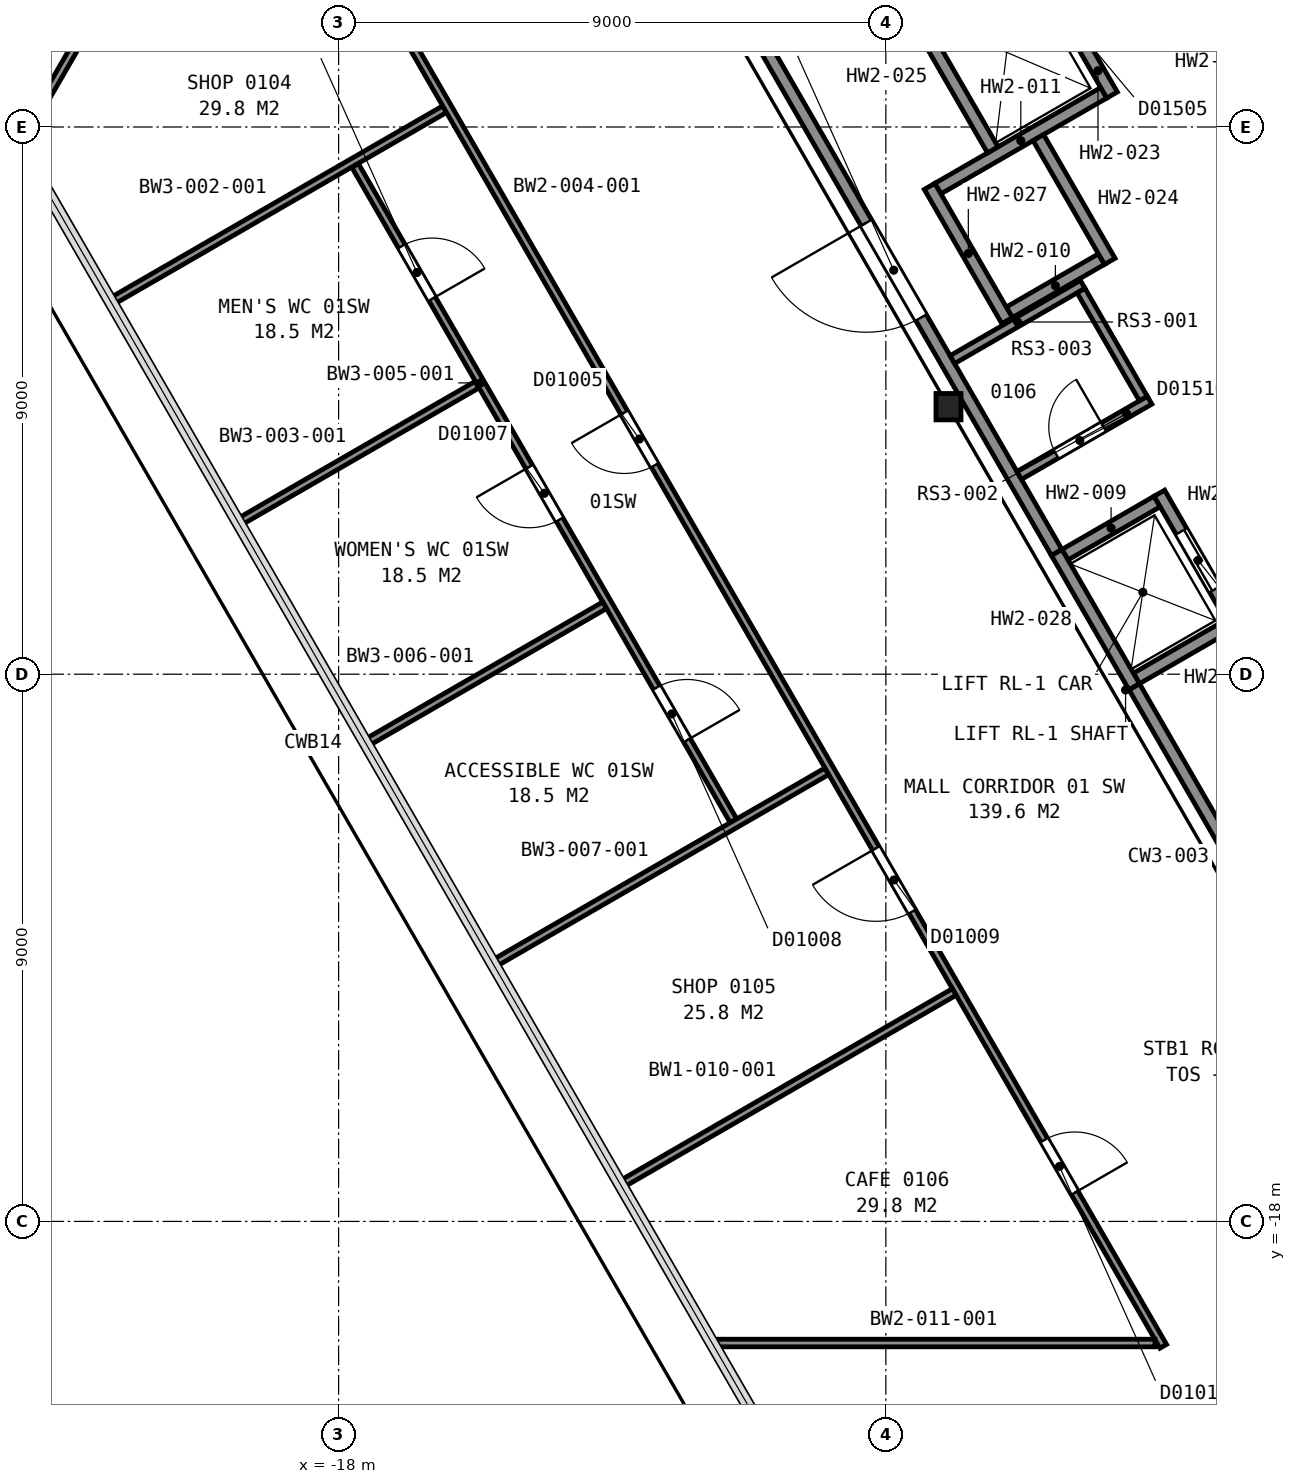
"""IFC4 building model, lengths in metres.
Left out: names, types, materials, properties, quantities, classifications, styles, units other than length and angle.
Written with IfcOpenShell. Run it as: python <this file> out.ifc"""

import sys

from ifc_helpers import new_model, si_unit, direction, frame, frame_2d, origin, origin_2d, place, context, subcontext, project, spatial, rectangle, i_section, extrude, element, fill, save


model = new_model("IFC4")
c1 = context("Model", 3, precision=1e-05, world=origin(), true_north=direction((0.0, 1.0)))
c2 = subcontext(c1, "Body", "Model", "MODEL_VIEW")
j1 = project(units=[si_unit("LENGTHUNIT", "METRE"), si_unit("PLANEANGLEUNIT", "RADIAN")], contexts=[c1])
p1 = place(None, origin())
s1 = spatial("IfcSite", under=j1, at=p1, CompositionType="ELEMENT")
p2 = place(p1, origin())
s2 = spatial("IfcBuilding", under=s1, at=p2, CompositionType="ELEMENT")
p3 = place(p2, frame((0.0, 0.0, 12.0)))
s3 = spatial("IfcBuildingStorey", under=s2, at=p3, CompositionType="ELEMENT", Elevation=12.0)
p4 = place(p3, frame((-7.97, -4.6, 0.0), z_axis=(0.0, 0.0, 1.0), x_axis=(1.0, 0.0, 0.0)))
e1 = element("IfcColumn", 1, at=p4, inside=s3, PredefinedType="COLUMN", context=c2, shape_type="SweptSolid", body=[
    extrude(i_section(OverallWidth=0.411, OverallDepth=0.434, WebThickness=0.036, FlangeThickness=0.057, FilletRadius=0.015, at=origin_2d()), origin(), (0.0, 0.0, 1.0), 5.4),
])
for number, where, z_axis, x_axis in (
    (2, (-4.879, -9.07, 0.0), (0.0, 0.0, 1.0), (0.866, 0.5, 0.0)),
    (3, (-6.054, -7.034, 0.0), (0.0, 0.0, 1.0), (0.866, 0.5, 0.0)),
    (4, (-6.97, -3.048, 0.0), (0.0, 0.0, 1.0), (0.866, 0.5, 0.0)),
):
    element("IfcWall", number, at=place(p3, frame(where, z_axis=z_axis, x_axis=x_axis)), inside=s3, PredefinedType="PARTITIONING", context=c2, shape_type="SweptSolid", body=[
        extrude(rectangle(XDim=1.75, YDim=0.2, at=frame_2d((0.875, 0.0))), origin(), (0.0, 0.0, 1.0), 5.4),
    ])
p5 = place(p3, frame((-8.145, -1.013, 0.0), z_axis=(0.0, 0.0, 1.0), x_axis=(0.866016494683, 0.500015430699, 0.0)))
e5 = element("IfcWall", 5, at=p5, inside=s3, PredefinedType="PARTITIONING", context=c2, shape_type="SweptSolid", body=[
    extrude(rectangle(XDim=3.15, YDim=0.2, at=frame_2d((1.575, 0.0))), origin(), (0.0, 0.0, 1.0), 5.4),
])
p6 = place(p3, frame((-5.28, 0.525, 0.0), z_axis=(0.0, 0.0, 1.0), x_axis=(-0.500037662692, 0.866003658127, 0.0)))
e6 = element("IfcWall", 6, at=p6, inside=s3, PredefinedType="PARTITIONING", context=c2, shape_type="SweptSolid", body=[
    extrude(rectangle(XDim=2.95, YDim=0.2, at=frame_2d((1.475, 0.0))), origin(), (0.0, 0.0, 1.0), 5.4),
])
p7 = place(p6, frame((0.925, 0.0, 0.0)))
e7 = element("IfcOpeningElement", 7, at=p7, cuts=e6, PredefinedType="OPENING", context=c2, shape_type="SweptSolid", body=[
    extrude(rectangle(XDim=1.1, YDim=2.1, at=frame_2d((0.55, 1.05))), frame((0.0, 0.11, 0.0), z_axis=(0.0, -1.0, 0.0), x_axis=(1.0, 0.0, 0.0)), (0.0, 0.0, 1.0), 0.22),
])
p8 = place(p3, frame((-5.318, -2.21, 0.0), z_axis=(0.0, 0.0, 1.0), x_axis=(-0.499938297808, 0.866061024631, 0.0)))
e8 = element("IfcWall", 8, at=p8, inside=s3, PredefinedType="PARTITIONING", context=c2, shape_type="SweptSolid", body=[
    extrude(rectangle(XDim=2.35, YDim=0.2, at=frame_2d((1.175, 0.0))), origin(), (0.0, 0.0, 1.0), 5.4),
])
p9 = place(p3, frame((-7.242, -0.376, 0.0), z_axis=(0.0, 0.0, 1.0), x_axis=(-0.499996545922, 0.866027397988, 0.0)))
e9 = element("IfcWall", 9, at=p9, inside=s3, PredefinedType="PARTITIONING", context=c2, shape_type="SweptSolid", body=[
    extrude(rectangle(XDim=2.75, YDim=0.2, at=frame_2d((1.375, 0.0))), origin(), (0.0, 0.0, 1.0), 5.4),
])
p10 = place(p3, frame((-3.227, -8.231, 0.0), z_axis=(0.0, 0.0, 1.0), x_axis=(-0.499948979701, 0.866054858364, 0.0)))
e10 = element("IfcWall", 10, at=p10, inside=s3, PredefinedType="PARTITIONING", context=c2, shape_type="SweptSolid", body=[
    extrude(rectangle(XDim=2.55, YDim=0.2, at=frame_2d((1.275, 0.0))), origin(), (0.0, 0.0, 1.0), 5.4),
])
p11 = place(p10, frame((0.725, 0.0, 0.0)))
e11 = element("IfcOpeningElement", 11, at=p11, cuts=e10, PredefinedType="OPENING", context=c2, shape_type="SweptSolid", body=[
    extrude(rectangle(XDim=1.1, YDim=2.1, at=frame_2d((0.55, 1.05))), frame((0.0, 0.11, 0.0), z_axis=(0.0, -1.0, 0.0), x_axis=(1.0, 0.0, 0.0)), (0.0, 0.0, 1.0), 0.22),
])
for number, where, z_axis, x_axis in (
    (12, (-7.006, -3.185, 0.0), (0.0, 0.0, 1.0), (-0.5, 0.866, 0.0)),
    (13, (-4.916, -9.206, 0.0), (0.0, 0.0, 1.0), (-0.5, 0.866, 0.0)),
):
    element("IfcWall", number, at=place(p3, frame(where, z_axis=z_axis, x_axis=x_axis)), inside=s3, PredefinedType="PARTITIONING", context=c2, shape_type="SweptSolid", body=[
        extrude(rectangle(XDim=2.55, YDim=0.2, at=frame_2d((1.275, 0.0))), origin(), (0.0, 0.0, 1.0), 5.4),
    ])
p12 = place(p3, frame((-13.666, 5.95, 0.0), z_axis=(0.0, 0.0, 1.0), x_axis=(0.499971736997, -0.866041720822, 0.0)))
e14 = element("IfcWall", 14, at=p12, inside=s3, PredefinedType="PARTITIONING", context=c2, shape_type="SweptSolid", body=[
    extrude(rectangle(XDim=14.949, YDim=0.2, at=frame_2d((7.475, 0.0))), origin(), (0.0, 0.0, 1.0), 5.15),
])
p13 = place(p12, frame((8.69, 0.0, 0.0)))
e15 = element("IfcOpeningElement", 15, at=p13, cuts=e14, PredefinedType="OPENING", context=c2, shape_type="SweptSolid", body=[
    extrude(rectangle(XDim=1.8, YDim=2.1, at=frame_2d((0.9, 1.05))), frame((0.0, 0.11, 0.0), z_axis=(0.0, -1.0, 0.0), x_axis=(1.0, 0.0, 0.0)), (0.0, 0.0, 1.0), 0.22),
])
p14 = place(p3, frame((-7.906, -3.826, 0.0), z_axis=(0.0, 0.0, 1.0), x_axis=(0.866031185235, 0.4999899861, 0.0)))
e16 = element("IfcWall", 16, at=p14, inside=s3, PredefinedType="PARTITIONING", context=c2, shape_type="SweptSolid", body=[
    extrude(rectangle(XDim=2.475, YDim=0.15, at=frame_2d((1.238, 0.0))), origin(), (0.0, 0.0, 1.0), 5.15),
])
p15 = place(p3, frame((-6.806, -5.731, 0.0), z_axis=(0.0, 0.0, 1.0), x_axis=(0.866006523861, 0.500032699561, 0.0)))
e17 = element("IfcWall", 17, at=p15, inside=s3, PredefinedType="PARTITIONING", context=c2, shape_type="SweptSolid", body=[
    extrude(rectangle(XDim=2.475, YDim=0.15, at=frame_2d((1.237, 0.0))), origin(), (0.0, 0.0, 1.0), 5.15),
])
p16 = place(p15, frame((0.7, 0.0, 0.0)))
e18 = element("IfcOpeningElement", 18, at=p16, cuts=e17, PredefinedType="OPENING", context=c2, shape_type="SweptSolid", body=[
    extrude(rectangle(XDim=0.9, YDim=2.1, at=frame_2d((0.45, 1.05))), frame((0.0, 0.085, 0.0), z_axis=(0.0, -1.0, 0.0), x_axis=(1.0, 0.0, 0.0)), (0.0, 0.0, 1.0), 0.17),
])
p17 = place(p3, frame((-5.791, -2.691, 0.0), z_axis=(0.0, 0.0, 1.0), x_axis=(0.500007699544, -0.866020958405, 0.0)))
e19 = element("IfcWall", 19, at=p17, inside=s3, PredefinedType="PARTITIONING", context=c2, shape_type="SweptSolid", body=[
    extrude(rectangle(XDim=2.05, YDim=0.15, at=frame_2d((1.025, 0.0))), origin(), (0.0, 0.0, 1.0), 5.15),
])
p18 = place(p3, frame((-4.914, -9.208, 0.0), z_axis=(0.0, 0.0, 1.0), x_axis=(0.499947703927, -0.866055594831, 0.0)))
e20 = element("IfcWall", 20, at=p18, inside=s3, PredefinedType="PARTITIONING", context=c2, shape_type="SweptSolid", body=[
    extrude(rectangle(XDim=6.474, YDim=0.2, at=frame_2d((3.237, 0.0))), origin(), (0.0, 0.0, 1.0), 5.15),
])
p19 = place(p3, frame((-23.25, -0.27, 0.0), z_axis=(0.0, 0.0, 1.0), x_axis=(0.500002873931, 0.866023744513, 0.0)))
e21 = element("IfcWall", 21, at=p19, inside=s3, PredefinedType="PARTITIONING", context=c2, shape_type="SweptSolid", body=[
    extrude(rectangle(XDim=7.285, YDim=0.125, at=frame_2d((3.643, 0.0))), origin(), (0.0, 0.0, 1.0), 5.24),
])
p20 = place(p3, frame((-21.746, -2.875, 0.0), z_axis=(0.0, 0.0, 1.0), x_axis=(0.866118237319, 0.499839173118, 0.0)))
e22 = element("IfcWall", 22, at=p20, inside=s3, PredefinedType="PARTITIONING", context=c2, shape_type="SweptSolid", body=[
    extrude(rectangle(XDim=6.337, YDim=0.125, at=frame_2d((3.169, 0.0))), origin(), (0.0, 0.0, 1.0), 4.253),
])
p21 = place(p3, frame((-19.65, -6.505, 0.0), z_axis=(0.0, 0.0, 1.0), x_axis=(0.866053739465, 0.49995091795, 0.0)))
e23 = element("IfcWall", 23, at=p21, inside=s3, PredefinedType="PARTITIONING", context=c2, shape_type="SweptSolid", body=[
    extrude(rectangle(XDim=4.533, YDim=0.125, at=frame_2d((2.266, 0.0))), origin(), (0.0, 0.0, 1.0), 5.24),
])
p22 = place(p3, frame((-4.438, -20.054, 0.0), z_axis=(0.0, 0.0, 1.0), x_axis=(-0.499994028088, 0.866028851642, 0.0)))
e24 = element("IfcWall", 24, at=p22, inside=s3, PredefinedType="PARTITIONING", context=c2, shape_type="SweptSolid", body=[
    extrude(rectangle(XDim=30.297, YDim=0.125, at=frame_2d((15.148, 0.0))), origin(), (0.0, 0.0, 1.0), 4.253),
])
p23 = place(p22, frame((26.285, 0.0, 0.0)))
e25 = element("IfcOpeningElement", 25, at=p23, cuts=e24, PredefinedType="OPENING", context=c2, shape_type="SweptSolid", body=[
    extrude(rectangle(XDim=1.2, YDim=2.1, at=frame_2d((0.6, 1.05))), frame((0.0, 0.073, 0.0), z_axis=(0.0, -1.0, 0.0), x_axis=(1.0, 0.0, 0.0)), (0.0, 0.0, 1.0), 0.145),
])
p24 = place(p22, frame((16.731, 0.0, 0.0)))
e26 = element("IfcOpeningElement", 26, at=p24, cuts=e24, PredefinedType="OPENING", context=c2, shape_type="SweptSolid", body=[
    extrude(rectangle(XDim=1.0, YDim=2.1, at=frame_2d((0.5, 1.05))), frame((0.0, 0.073, 0.0), z_axis=(0.0, -1.0, 0.0), x_axis=(1.0, 0.0, 0.0)), (0.0, 0.0, 1.0), 0.145),
])
p25 = place(p22, frame((8.257, 0.0, 0.0)))
e27 = element("IfcOpeningElement", 27, at=p25, cuts=e24, PredefinedType="OPENING", context=c2, shape_type="SweptSolid", body=[
    extrude(rectangle(XDim=1.2, YDim=2.1, at=frame_2d((0.6, 1.05))), frame((0.0, 0.073, 0.0), z_axis=(0.0, -1.0, 0.0), x_axis=(1.0, 0.0, 0.0)), (0.0, 0.0, 1.0), 0.145),
])
p26 = place(p22, frame((2.916, 0.0, 0.0)))
e28 = element("IfcOpeningElement", 28, at=p26, cuts=e24, PredefinedType="OPENING", context=c2, shape_type="SweptSolid", body=[
    extrude(rectangle(XDim=1.0, YDim=2.1, at=frame_2d((0.5, 1.05))), frame((0.0, 0.073, 0.0), z_axis=(0.0, -1.0, 0.0), x_axis=(1.0, 0.0, 0.0)), (0.0, 0.0, 1.0), 0.145),
])
p27 = place(p3, frame((-11.506, -11.411, 0.0), z_axis=(0.0, 0.0, 1.0), x_axis=(-0.499977189168, 0.866038573224, 0.0)))
e29 = element("IfcWall", 29, at=p27, inside=s3, PredefinedType="PARTITIONING", context=c2, shape_type="SweptSolid", body=[
    extrude(rectangle(XDim=12.444, YDim=0.125, at=frame_2d((6.222, 0.0))), origin(), (0.0, 0.0, 1.0), 5.24),
])
p28 = place(p27, frame((9.912, 0.0, 0.0)))
e30 = element("IfcOpeningElement", 30, at=p28, cuts=e29, PredefinedType="OPENING", context=c2, shape_type="SweptSolid", body=[
    extrude(rectangle(XDim=1.0, YDim=2.1, at=frame_2d((0.5, 1.05))), frame((0.0, 0.073, 0.0), z_axis=(0.0, -1.0, 0.0), x_axis=(1.0, 0.0, 0.0)), (0.0, 0.0, 1.0), 0.145),
])
p29 = place(p27, frame((5.72, 0.0, 0.0)))
e31 = element("IfcOpeningElement", 31, at=p29, cuts=e29, PredefinedType="OPENING", context=c2, shape_type="SweptSolid", body=[
    extrude(rectangle(XDim=1.0, YDim=2.1, at=frame_2d((0.5, 1.05))), frame((0.0, 0.073, 0.0), z_axis=(0.0, -1.0, 0.0), x_axis=(1.0, 0.0, 0.0)), (0.0, 0.0, 1.0), 0.145),
])
p30 = place(p27, frame((1.529, 0.0, 0.0)))
e32 = element("IfcOpeningElement", 32, at=p30, cuts=e29, PredefinedType="OPENING", context=c2, shape_type="SweptSolid", body=[
    extrude(rectangle(XDim=1.0, YDim=2.1, at=frame_2d((0.5, 1.05))), frame((0.0, 0.073, 0.0), z_axis=(0.0, -1.0, 0.0), x_axis=(1.0, 0.0, 0.0)), (0.0, 0.0, 1.0), 0.145),
])
p31 = place(p3, frame((-17.555, -10.135, 0.0), z_axis=(0.0, 0.0, 1.0), x_axis=(0.866026101152, 0.499998792122, 0.0)))
e33 = element("IfcWall", 33, at=p31, inside=s3, PredefinedType="PARTITIONING", context=c2, shape_type="SweptSolid", body=[
    extrude(rectangle(XDim=4.538, YDim=0.125, at=frame_2d((2.269, 0.0))), origin(), (0.0, 0.0, 1.0), 4.253),
])
p32 = place(p3, frame((-15.459, -13.765, 0.0), z_axis=(0.0, 0.0, 1.0), x_axis=(0.866044997331, 0.499966061446, 0.0)))
e34 = element("IfcWall", 34, at=p32, inside=s3, PredefinedType="PARTITIONING", context=c2, shape_type="SweptSolid", body=[
    extrude(rectangle(XDim=6.333, YDim=0.125, at=frame_2d((3.167, 0.0))), origin(), (0.0, 0.0, 1.0), 5.24),
])
p33 = place(p3, frame((-13.363, -17.395, 0.0), z_axis=(0.0, 0.0, 1.0), x_axis=(0.866003371142, 0.500038159714, 0.0)))
e35 = element("IfcWall", 35, at=p33, inside=s3, PredefinedType="PARTITIONING", context=c2, shape_type="SweptSolid", body=[
    extrude(rectangle(XDim=6.337, YDim=0.125, at=frame_2d((3.168, 0.0))), origin(), (0.0, 0.0, 1.0), 4.253),
])
p34 = place(p3, frame((-11.859, -20.0, 0.0), z_axis=(0.0, 0.0, 1.0), x_axis=(1.0, 0.0, 0.0)))
e36 = element("IfcWall", 36, at=p34, inside=s3, PredefinedType="PARTITIONING", context=c2, shape_type="SweptSolid", body=[
    extrude(rectangle(XDim=7.285, YDim=0.125, at=frame_2d((3.643, 0.0))), origin(), (0.0, 0.0, 1.0), 5.24),
])
p35 = place(p11, origin())
e37 = element("IfcDoor", 37, at=p35, inside=s3, OperationType="SLIDING_TO_LEFT", PredefinedType="DOOR", context=c2, shape_type="SweptSolid", body=[
    extrude(rectangle(XDim=1.1, YDim=2.1, at=frame_2d((0.55, 1.05))), frame((0.0, 0.025, 0.0), z_axis=(0.0, -1.0, 0.0), x_axis=(1.0, 0.0, 0.0)), (0.0, 0.0, 1.0), 0.05),
])
fill(e11, e37)
p36 = place(p13, origin())
e38 = element("IfcDoor", 38, at=p36, inside=s3, OperationType="DOUBLE_DOOR_SINGLE_SWING", PredefinedType="DOOR", context=c2, shape_type="SweptSolid", body=[
    extrude(rectangle(XDim=1.8, YDim=2.1, at=frame_2d((0.9, 1.05))), frame((0.0, 0.025, 0.0), z_axis=(0.0, -1.0, 0.0), x_axis=(1.0, 0.0, 0.0)), (0.0, 0.0, 1.0), 0.05),
])
fill(e15, e38)
p37 = place(p16, origin())
e39 = element("IfcDoor", 39, at=p37, inside=s3, OperationType="SINGLE_SWING_RIGHT", PredefinedType="DOOR", context=c2, shape_type="SweptSolid", body=[
    extrude(rectangle(XDim=0.9, YDim=2.1, at=frame_2d((0.45, 1.05))), frame((0.0, 0.025, 0.0), z_axis=(0.0, -1.0, 0.0), x_axis=(1.0, 0.0, 0.0)), (0.0, 0.0, 1.0), 0.05),
])
fill(e18, e39)
p38 = place(p24, origin())
e40 = element("IfcDoor", 40, at=p38, inside=s3, OperationType="SINGLE_SWING_RIGHT", PredefinedType="DOOR", context=c2, shape_type="SweptSolid", body=[
    extrude(rectangle(XDim=1.0, YDim=2.1, at=frame_2d((0.5, 1.05))), frame((0.0, 0.025, 0.0), z_axis=(0.0, -1.0, 0.0), x_axis=(1.0, 0.0, 0.0)), (0.0, 0.0, 1.0), 0.05),
])
fill(e26, e40)
p39 = place(p25, origin())
e41 = element("IfcDoor", 41, at=p39, inside=s3, OperationType="SINGLE_SWING_RIGHT", PredefinedType="DOOR", context=c2, shape_type="SweptSolid", body=[
    extrude(rectangle(XDim=1.2, YDim=2.1, at=frame_2d((0.6, 1.05))), frame((0.0, 0.025, 0.0), z_axis=(0.0, -1.0, 0.0), x_axis=(1.0, 0.0, 0.0)), (0.0, 0.0, 1.0), 0.05),
])
fill(e27, e41)
p40 = place(p26, origin())
e42 = element("IfcDoor", 42, at=p40, inside=s3, OperationType="SINGLE_SWING_LEFT", PredefinedType="DOOR", context=c2, shape_type="SweptSolid", body=[
    extrude(rectangle(XDim=1.0, YDim=2.1, at=frame_2d((0.5, 1.05))), frame((0.0, 0.025, 0.0), z_axis=(0.0, -1.0, 0.0), x_axis=(1.0, 0.0, 0.0)), (0.0, 0.0, 1.0), 0.05),
])
fill(e28, e42)
p41 = place(p28, origin())
e43 = element("IfcDoor", 43, at=p41, inside=s3, OperationType="SINGLE_SWING_LEFT", PredefinedType="DOOR", context=c2, shape_type="SweptSolid", body=[
    extrude(rectangle(XDim=1.0, YDim=2.1, at=frame_2d((0.5, 1.05))), frame((0.0, 0.025, 0.0), z_axis=(0.0, -1.0, 0.0), x_axis=(1.0, 0.0, 0.0)), (0.0, 0.0, 1.0), 0.05),
])
fill(e30, e43)
p42 = place(p29, origin())
e44 = element("IfcDoor", 44, at=p42, inside=s3, OperationType="SINGLE_SWING_RIGHT", PredefinedType="DOOR", context=c2, shape_type="SweptSolid", body=[
    extrude(rectangle(XDim=1.0, YDim=2.1, at=frame_2d((0.5, 1.05))), frame((0.0, 0.025, 0.0), z_axis=(0.0, -1.0, 0.0), x_axis=(1.0, 0.0, 0.0)), (0.0, 0.0, 1.0), 0.05),
])
fill(e31, e44)
p43 = place(p30, origin())
e45 = element("IfcDoor", 45, at=p43, inside=s3, OperationType="SINGLE_SWING_LEFT", PredefinedType="DOOR", context=c2, shape_type="SweptSolid", body=[
    extrude(rectangle(XDim=1.0, YDim=2.1, at=frame_2d((0.5, 1.05))), frame((0.0, 0.025, 0.0), z_axis=(0.0, -1.0, 0.0), x_axis=(1.0, 0.0, 0.0)), (0.0, 0.0, 1.0), 0.05),
])
fill(e32, e45)
save(model, sys.argv[1])
